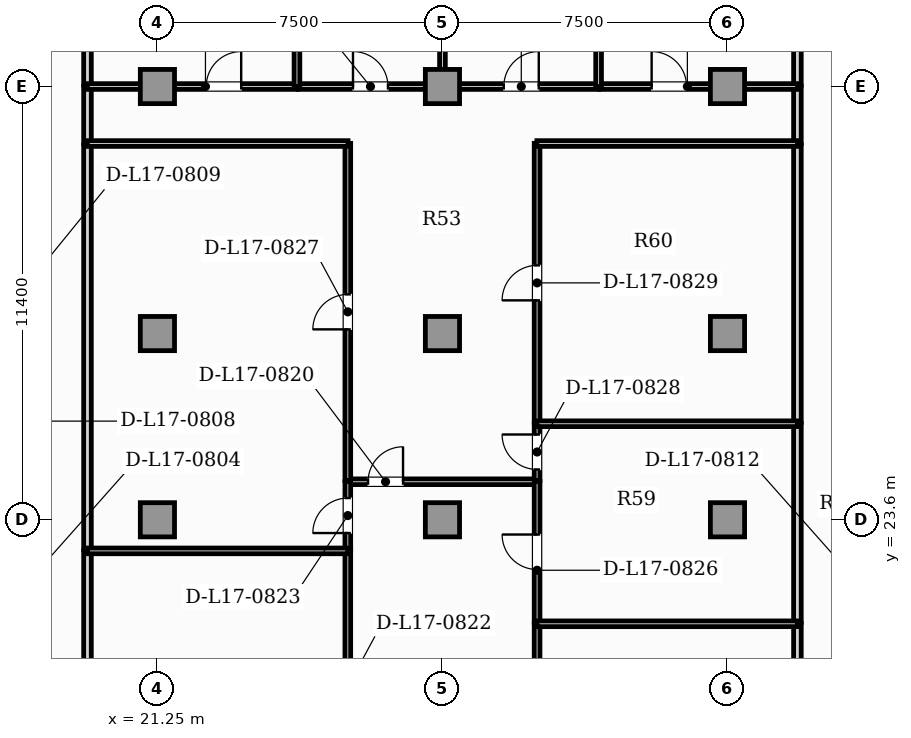
"""IFC4 building model, lengths in metres.
Left out: names, types, materials, properties, quantities, classifications, styles, units other than length and angle.
Written with IfcOpenShell. Run it as: python <this file> out.ifc"""

import sys

from ifc_helpers import new_model, si_unit, direction, frame, frame_2d, origin, origin_2d, place, context, subcontext, project, spatial, rectangle, extrude, element, fill, save


model = new_model("IFC4")
c1 = context("Model", 3, precision=1e-05, world=origin(), true_north=direction((0.0, 1.0)))
c2 = subcontext(c1, "Body", "Model", "MODEL_VIEW")
j1 = project(units=[si_unit("LENGTHUNIT", "METRE"), si_unit("PLANEANGLEUNIT", "RADIAN")], contexts=[c1])
p1 = place(None, origin())
s1 = spatial("IfcSite", under=j1, at=p1, CompositionType="ELEMENT")
p2 = place(p1, origin())
s2 = spatial("IfcBuilding", under=s1, at=p2, CompositionType="ELEMENT")
p3 = place(p2, frame((0.0, 0.0, 72.15)))
s3 = spatial("IfcBuildingStorey", under=s2, at=p3, CompositionType="ELEMENT", Elevation=72.15)
for number, where, z_axis, x_axis in (
    (1, (21.25, 23.6, 0.0), (0.0, 0.0, 1.0), (1.0, 0.0, 0.0)),
    (2, (28.75, 23.6, 0.0), (0.0, 0.0, 1.0), (1.0, 0.0, 0.0)),
    (3, (36.25, 23.6, 0.0), (0.0, 0.0, 1.0), (1.0, 0.0, 0.0)),
    (4, (21.25, 28.5, 0.0), (0.0, 0.0, 1.0), (1.0, 0.0, 0.0)),
    (5, (28.75, 28.5, 0.0), (0.0, 0.0, 1.0), (1.0, 0.0, 0.0)),
    (6, (36.25, 28.5, 0.0), (0.0, 0.0, 1.0), (1.0, 0.0, 0.0)),
    (7, (21.25, 35.0, 0.0), (0.0, 0.0, 1.0), (1.0, 0.0, 0.0)),
    (8, (28.75, 35.0, 0.0), (0.0, 0.0, 1.0), (1.0, 0.0, 0.0)),
    (9, (36.25, 35.0, 0.0), (0.0, 0.0, 1.0), (1.0, 0.0, 0.0)),
):
    element("IfcColumn", number, at=place(p3, frame(where, z_axis=z_axis, x_axis=x_axis)), inside=s3, PredefinedType="COLUMN", context=c2, shape_type="SweptSolid", body=[
        extrude(rectangle(XDim=0.9, YDim=0.9, at=origin_2d()), origin(), (0.0, 0.0, 1.0), 3.85),
    ])
p4 = place(p3, frame((19.41, 33.495, 0.0), z_axis=(0.0, 0.0, 1.0), x_axis=(0.0, 1.0, 0.0)))
e10 = element("IfcWall", 10, at=p4, inside=s3, PredefinedType="PARTITIONING", context=c2, shape_type="SweptSolid", body=[
    extrude(rectangle(XDim=1.51, YDim=0.2, at=frame_2d((0.755, 0.0))), origin(), (0.0, 0.0, 1.0), 3.57),
])
p5 = place(p3, frame((19.41, 18.792, 0.0), z_axis=(0.0, 0.0, 1.0), x_axis=(0.0, 1.0, 0.0)))
e11 = element("IfcWall", 11, at=p5, inside=s3, PredefinedType="PARTITIONING", context=c2, shape_type="SweptSolid", body=[
    extrude(rectangle(XDim=3.995, YDim=0.2, at=frame_2d((1.998, 0.0))), origin(), (0.0, 0.0, 1.0), 3.57),
])
p6 = place(p3, frame((19.41, 22.817, 0.0), z_axis=(0.0, 0.0, 1.0), x_axis=(0.0, 1.0, 0.0)))
e12 = element("IfcWall", 12, at=p6, inside=s3, PredefinedType="PARTITIONING", context=c2, shape_type="SweptSolid", body=[
    extrude(rectangle(XDim=10.648, YDim=0.2, at=frame_2d((5.324, 0.0))), origin(), (0.0, 0.0, 1.0), 3.57),
])
p7 = place(p3, frame((19.41, 35.035, 0.0), z_axis=(0.0, 0.0, 1.0), x_axis=(0.0, 1.0, 0.0)))
e13 = element("IfcWall", 13, at=p7, inside=s3, PredefinedType="PARTITIONING", context=c2, shape_type="SweptSolid", body=[
    extrude(rectangle(XDim=3.55, YDim=0.2, at=frame_2d((1.775, 0.0))), origin(), (0.0, 0.0, 1.0), 3.57),
])
p8 = place(p3, frame((38.09, 33.495, 0.0), z_axis=(0.0, 0.0, 1.0), x_axis=(0.0, 1.0, 0.0)))
e14 = element("IfcWall", 14, at=p8, inside=s3, PredefinedType="PARTITIONING", context=c2, shape_type="SweptSolid", body=[
    extrude(rectangle(XDim=1.51, YDim=0.2, at=frame_2d((0.755, 0.0))), origin(), (0.0, 0.0, 1.0), 3.57),
])
p9 = place(p3, frame((38.09, 17.265, 0.0), z_axis=(0.0, 0.0, 1.0), x_axis=(0.0, 1.0, 0.0)))
e15 = element("IfcWall", 15, at=p9, inside=s3, PredefinedType="PARTITIONING", context=c2, shape_type="SweptSolid", body=[
    extrude(rectangle(XDim=3.604, YDim=0.2, at=frame_2d((1.802, 0.0))), origin(), (0.0, 0.0, 1.0), 3.57),
])
p10 = place(p3, frame((38.09, 20.899, 0.0), z_axis=(0.0, 0.0, 1.0), x_axis=(0.0, 1.0, 0.0)))
e16 = element("IfcWall", 16, at=p10, inside=s3, PredefinedType="PARTITIONING", context=c2, shape_type="SweptSolid", body=[
    extrude(rectangle(XDim=5.234, YDim=0.2, at=frame_2d((2.617, 0.0))), origin(), (0.0, 0.0, 1.0), 3.57),
])
p11 = place(p3, frame((38.09, 26.162, 0.0), z_axis=(0.0, 0.0, 1.0), x_axis=(0.0, 1.0, 0.0)))
e17 = element("IfcWall", 17, at=p11, inside=s3, PredefinedType="PARTITIONING", context=c2, shape_type="SweptSolid", body=[
    extrude(rectangle(XDim=7.303, YDim=0.2, at=frame_2d((3.651, 0.0))), origin(), (0.0, 0.0, 1.0), 3.57),
])
p12 = place(p3, frame((38.09, 35.035, 0.0), z_axis=(0.0, 0.0, 1.0), x_axis=(0.0, 1.0, 0.0)))
e18 = element("IfcWall", 18, at=p12, inside=s3, PredefinedType="PARTITIONING", context=c2, shape_type="SweptSolid", body=[
    extrude(rectangle(XDim=3.55, YDim=0.2, at=frame_2d((1.775, 0.0))), origin(), (0.0, 0.0, 1.0), 3.57),
])
p13 = place(p3, frame((26.255, 24.601, 0.0), z_axis=(0.0, 0.0, 1.0), x_axis=(1.0, 0.0, 0.0)))
e19 = element("IfcWall", 19, at=p13, inside=s3, PredefinedType="PARTITIONING", context=c2, shape_type="SweptSolid", body=[
    extrude(rectangle(XDim=4.99, YDim=0.15, at=frame_2d((2.495, 0.0))), origin(), (0.0, 0.0, 1.0), 3.57),
])
p14 = place(p13, frame((0.538, 0.0, 0.0)))
e20 = element("IfcOpeningElement", 20, at=p14, cuts=e19, PredefinedType="OPENING", context=c2, shape_type="SweptSolid", body=[
    extrude(rectangle(XDim=0.92, YDim=2.1, at=frame_2d((0.46, 1.05))), frame((0.0, 0.085, 0.0), z_axis=(0.0, -1.0, 0.0), x_axis=(1.0, 0.0, 0.0)), (0.0, 0.0, 1.0), 0.17),
])
p15 = place(p3, frame((26.26, 15.635, 0.0), z_axis=(0.0, 0.0, 1.0), x_axis=(0.0, 1.0, 0.0)))
e21 = element("IfcWall", 21, at=p15, inside=s3, PredefinedType="PARTITIONING", context=c2, shape_type="SweptSolid", body=[
    extrude(rectangle(XDim=7.152, YDim=0.15, at=frame_2d((3.576, 0.0))), origin(), (0.0, 0.0, 1.0), 3.57),
])
p16 = place(p15, frame((3.116, 0.0, 0.0)))
e22 = element("IfcOpeningElement", 22, at=p16, cuts=e21, PredefinedType="OPENING", context=c2, shape_type="SweptSolid", body=[
    extrude(rectangle(XDim=0.92, YDim=2.1, at=frame_2d((0.46, 1.05))), frame((0.0, 0.085, 0.0), z_axis=(0.0, -1.0, 0.0), x_axis=(1.0, 0.0, 0.0)), (0.0, 0.0, 1.0), 0.17),
])
p17 = place(p3, frame((26.26, 22.817, 0.0), z_axis=(0.0, 0.0, 1.0), x_axis=(0.0, 1.0, 0.0)))
e23 = element("IfcWall", 23, at=p17, inside=s3, PredefinedType="PARTITIONING", context=c2, shape_type="SweptSolid", body=[
    extrude(rectangle(XDim=1.789, YDim=0.15, at=frame_2d((0.895, 0.0))), origin(), (0.0, 0.0, 1.0), 3.57),
])
p18 = place(p17, frame((0.435, 0.0, 0.0)))
e24 = element("IfcOpeningElement", 24, at=p18, cuts=e23, PredefinedType="OPENING", context=c2, shape_type="SweptSolid", body=[
    extrude(rectangle(XDim=0.92, YDim=2.1, at=frame_2d((0.46, 1.05))), frame((0.0, 0.085, 0.0), z_axis=(0.0, -1.0, 0.0), x_axis=(1.0, 0.0, 0.0)), (0.0, 0.0, 1.0), 0.17),
])
p19 = place(p3, frame((31.24, 15.635, 0.0), z_axis=(0.0, 0.0, 1.0), x_axis=(0.0, 1.0, 0.0)))
e25 = element("IfcWall", 25, at=p19, inside=s3, PredefinedType="PARTITIONING", context=c2, shape_type="SweptSolid", body=[
    extrude(rectangle(XDim=5.234, YDim=0.15, at=frame_2d((2.617, 0.0))), origin(), (0.0, 0.0, 1.0), 3.57),
])
p20 = place(p19, frame((2.157, 0.0, 0.0)))
e26 = element("IfcOpeningElement", 26, at=p20, cuts=e25, PredefinedType="OPENING", context=c2, shape_type="SweptSolid", body=[
    extrude(rectangle(XDim=0.92, YDim=2.1, at=frame_2d((0.46, 1.05))), frame((0.0, 0.085, 0.0), z_axis=(0.0, -1.0, 0.0), x_axis=(1.0, 0.0, 0.0)), (0.0, 0.0, 1.0), 0.17),
])
p21 = place(p3, frame((31.24, 20.899, 0.0), z_axis=(0.0, 0.0, 1.0), x_axis=(0.0, 1.0, 0.0)))
e27 = element("IfcWall", 27, at=p21, inside=s3, PredefinedType="PARTITIONING", context=c2, shape_type="SweptSolid", body=[
    extrude(rectangle(XDim=3.707, YDim=0.15, at=frame_2d((1.854, 0.0))), origin(), (0.0, 0.0, 1.0), 3.57),
])
p22 = place(p21, frame((1.394, 0.0, 0.0)))
e28 = element("IfcOpeningElement", 28, at=p22, cuts=e27, PredefinedType="OPENING", context=c2, shape_type="SweptSolid", body=[
    extrude(rectangle(XDim=0.92, YDim=2.1, at=frame_2d((0.46, 1.05))), frame((0.0, 0.085, 0.0), z_axis=(0.0, -1.0, 0.0), x_axis=(1.0, 0.0, 0.0)), (0.0, 0.0, 1.0), 0.17),
])
p23 = place(p3, frame((26.26, 24.636, 0.0), z_axis=(0.0, 0.0, 1.0), x_axis=(0.0, 1.0, 0.0)))
e29 = element("IfcWall", 29, at=p23, inside=s3, PredefinedType="PARTITIONING", context=c2, shape_type="SweptSolid", body=[
    extrude(rectangle(XDim=8.869, YDim=0.15, at=frame_2d((4.435, 0.0))), origin(), (0.0, 0.0, 1.0), 3.57),
])
p24 = place(p23, frame((3.975, 0.0, 0.0)))
e30 = element("IfcOpeningElement", 30, at=p24, cuts=e29, PredefinedType="OPENING", context=c2, shape_type="SweptSolid", body=[
    extrude(rectangle(XDim=0.92, YDim=2.1, at=frame_2d((0.46, 1.05))), frame((0.0, 0.085, 0.0), z_axis=(0.0, -1.0, 0.0), x_axis=(1.0, 0.0, 0.0)), (0.0, 0.0, 1.0), 0.17),
])
p25 = place(p3, frame((19.405, 33.5, 0.0), z_axis=(0.0, 0.0, 1.0), x_axis=(1.0, 0.0, 0.0)))
e31 = element("IfcWall", 31, at=p25, inside=s3, PredefinedType="PARTITIONING", context=c2, shape_type="SweptSolid", body=[
    extrude(rectangle(XDim=6.86, YDim=0.15, at=frame_2d((3.43, 0.0))), origin(), (0.0, 0.0, 1.0), 3.57),
])
p26 = place(p3, frame((31.24, 24.636, 0.0), z_axis=(0.0, 0.0, 1.0), x_axis=(0.0, 1.0, 0.0)))
e32 = element("IfcWall", 32, at=p26, inside=s3, PredefinedType="PARTITIONING", context=c2, shape_type="SweptSolid", body=[
    extrude(rectangle(XDim=1.497, YDim=0.15, at=frame_2d((0.748, 0.0))), origin(), (0.0, 0.0, 1.0), 3.57),
])
p27 = place(p26, frame((0.288, 0.0, 0.0)))
e33 = element("IfcOpeningElement", 33, at=p27, cuts=e32, PredefinedType="OPENING", context=c2, shape_type="SweptSolid", body=[
    extrude(rectangle(XDim=0.92, YDim=2.1, at=frame_2d((0.46, 1.05))), frame((0.0, 0.085, 0.0), z_axis=(0.0, -1.0, 0.0), x_axis=(1.0, 0.0, 0.0)), (0.0, 0.0, 1.0), 0.17),
])
p28 = place(p3, frame((31.24, 26.162, 0.0), z_axis=(0.0, 0.0, 1.0), x_axis=(0.0, 1.0, 0.0)))
e34 = element("IfcWall", 34, at=p28, inside=s3, PredefinedType="PARTITIONING", context=c2, shape_type="SweptSolid", body=[
    extrude(rectangle(XDim=7.343, YDim=0.15, at=frame_2d((3.671, 0.0))), origin(), (0.0, 0.0, 1.0), 3.57),
])
p29 = place(p28, frame((3.211, 0.0, 0.0)))
e35 = element("IfcOpeningElement", 35, at=p29, cuts=e34, PredefinedType="OPENING", context=c2, shape_type="SweptSolid", body=[
    extrude(rectangle(XDim=0.92, YDim=2.1, at=frame_2d((0.46, 1.05))), frame((0.0, 0.085, 0.0), z_axis=(0.0, -1.0, 0.0), x_axis=(1.0, 0.0, 0.0)), (0.0, 0.0, 1.0), 0.17),
])
p30 = place(p3, frame((31.235, 33.5, 0.0), z_axis=(0.0, 0.0, 1.0), x_axis=(1.0, 0.0, 0.0)))
e36 = element("IfcWall", 36, at=p30, inside=s3, PredefinedType="PARTITIONING", context=c2, shape_type="SweptSolid", body=[
    extrude(rectangle(XDim=6.86, YDim=0.15, at=frame_2d((3.43, 0.0))), origin(), (0.0, 0.0, 1.0), 3.57),
])
p31 = place(p3, frame((19.405, 35.0, 0.0), z_axis=(0.0, 0.0, 1.0), x_axis=(1.0, 0.0, 0.0)))
e37 = element("IfcWall", 37, at=p31, inside=s3, PredefinedType="PARTITIONING", context=c2, shape_type="SweptSolid", body=[
    extrude(rectangle(XDim=5.522, YDim=0.15, at=frame_2d((2.761, 0.0))), origin(), (0.0, 0.0, 1.0), 2.934),
])
p32 = place(p31, frame((3.129, 0.0, 0.0)))
e38 = element("IfcOpeningElement", 38, at=p32, cuts=e37, PredefinedType="OPENING", context=c2, shape_type="SweptSolid", body=[
    extrude(rectangle(XDim=0.92, YDim=2.1, at=frame_2d((0.46, 1.05))), frame((0.0, 0.085, 0.0), z_axis=(0.0, -1.0, 0.0), x_axis=(1.0, 0.0, 0.0)), (0.0, 0.0, 1.0), 0.17),
])
p33 = place(p3, frame((24.957, 35.0, 0.0), z_axis=(0.0, 0.0, 1.0), x_axis=(1.0, 0.0, 0.0)))
e39 = element("IfcWall", 39, at=p33, inside=s3, PredefinedType="PARTITIONING", context=c2, shape_type="SweptSolid", body=[
    extrude(rectangle(XDim=3.798, YDim=0.15, at=frame_2d((1.899, 0.0))), origin(), (0.0, 0.0, 1.0), 2.934),
])
p34 = place(p33, frame((1.439, 0.0, 0.0)))
e40 = element("IfcOpeningElement", 40, at=p34, cuts=e39, PredefinedType="OPENING", context=c2, shape_type="SweptSolid", body=[
    extrude(rectangle(XDim=0.92, YDim=2.1, at=frame_2d((0.46, 1.05))), frame((0.0, 0.085, 0.0), z_axis=(0.0, -1.0, 0.0), x_axis=(1.0, 0.0, 0.0)), (0.0, 0.0, 1.0), 0.17),
])
p35 = place(p3, frame((28.785, 35.0, 0.0), z_axis=(0.0, 0.0, 1.0), x_axis=(1.0, 0.0, 0.0)))
e41 = element("IfcWall", 41, at=p35, inside=s3, PredefinedType="PARTITIONING", context=c2, shape_type="SweptSolid", body=[
    extrude(rectangle(XDim=4.079, YDim=0.15, at=frame_2d((2.04, 0.0))), origin(), (0.0, 0.0, 1.0), 2.934),
])
p36 = place(p35, frame((1.579, 0.0, 0.0)))
e42 = element("IfcOpeningElement", 42, at=p36, cuts=e41, PredefinedType="OPENING", context=c2, shape_type="SweptSolid", body=[
    extrude(rectangle(XDim=0.92, YDim=2.1, at=frame_2d((0.46, 1.05))), frame((0.0, 0.085, 0.0), z_axis=(0.0, -1.0, 0.0), x_axis=(1.0, 0.0, 0.0)), (0.0, 0.0, 1.0), 0.17),
])
p37 = place(p3, frame((32.894, 35.0, 0.0), z_axis=(0.0, 0.0, 1.0), x_axis=(1.0, 0.0, 0.0)))
e43 = element("IfcWall", 43, at=p37, inside=s3, PredefinedType="PARTITIONING", context=c2, shape_type="SweptSolid", body=[
    extrude(rectangle(XDim=5.201, YDim=0.15, at=frame_2d((2.601, 0.0))), origin(), (0.0, 0.0, 1.0), 2.934),
])
p38 = place(p37, frame((1.361, 0.0, 0.0)))
e44 = element("IfcOpeningElement", 44, at=p38, cuts=e43, PredefinedType="OPENING", context=c2, shape_type="SweptSolid", body=[
    extrude(rectangle(XDim=0.92, YDim=2.1, at=frame_2d((0.46, 1.05))), frame((0.0, 0.085, 0.0), z_axis=(0.0, -1.0, 0.0), x_axis=(1.0, 0.0, 0.0)), (0.0, 0.0, 1.0), 0.17),
])
for number, where, z_axis, x_axis in (
    (45, (19.405, 22.782, 0.0), (0.0, 0.0, 1.0), (1.0, 0.0, 0.0)),
    (46, (31.235, 20.864, 0.0), (0.0, 0.0, 1.0), (1.0, 0.0, 0.0)),
    (47, (31.235, 26.127, 0.0), (0.0, 0.0, 1.0), (1.0, 0.0, 0.0)),
):
    element("IfcWall", number, at=place(p3, frame(where, z_axis=z_axis, x_axis=x_axis)), inside=s3, PredefinedType="PARTITIONING", context=c2, shape_type="SweptSolid", body=[
        extrude(rectangle(XDim=6.86, YDim=0.15, at=frame_2d((3.43, 0.0))), origin(), (0.0, 0.0, 1.0), 3.57),
    ])
p39 = place(p3, frame((24.922, 34.995, 0.0), z_axis=(0.0, 0.0, 1.0), x_axis=(0.0, 1.0, 0.0)))
e48 = element("IfcWall", 48, at=p39, inside=s3, PredefinedType="PARTITIONING", context=c2, shape_type="SweptSolid", body=[
    extrude(rectangle(XDim=6.395, YDim=0.15, at=frame_2d((3.197, 0.0))), origin(), (0.0, 0.0, 1.0), 3.57),
])
p40 = place(p3, frame((28.75, 34.995, 0.0), z_axis=(0.0, 0.0, 1.0), x_axis=(0.0, 1.0, 0.0)))
e49 = element("IfcWall", 49, at=p40, inside=s3, PredefinedType="PARTITIONING", context=c2, shape_type="SweptSolid", body=[
    extrude(rectangle(XDim=6.395, YDim=0.15, at=frame_2d((3.197, 0.0))), origin(), (0.0, 0.0, 1.0), 3.11),
])
p41 = place(p3, frame((32.859, 34.995, 0.0), z_axis=(0.0, 0.0, 1.0), x_axis=(0.0, 1.0, 0.0)))
e50 = element("IfcWall", 50, at=p41, inside=s3, PredefinedType="PARTITIONING", context=c2, shape_type="SweptSolid", body=[
    extrude(rectangle(XDim=6.395, YDim=0.15, at=frame_2d((3.197, 0.0))), origin(), (0.0, 0.0, 1.0), 3.57),
])
p42 = place(p14, origin())
e51 = element("IfcDoor", 51, at=p42, inside=s3, OperationType="SINGLE_SWING_RIGHT", PredefinedType="DOOR", context=c2, shape_type="SweptSolid", body=[
    extrude(rectangle(XDim=0.92, YDim=2.1, at=frame_2d((0.46, 1.05))), frame((0.0, 0.025, 0.0), z_axis=(0.0, -1.0, 0.0), x_axis=(1.0, 0.0, 0.0)), (0.0, 0.0, 1.0), 0.05),
])
fill(e20, e51)
p43 = place(p18, origin())
e52 = element("IfcDoor", 52, at=p43, inside=s3, OperationType="SINGLE_SWING_LEFT", PredefinedType="DOOR", context=c2, shape_type="SweptSolid", body=[
    extrude(rectangle(XDim=0.92, YDim=2.1, at=frame_2d((0.46, 1.05))), frame((0.0, 0.025, 0.0), z_axis=(0.0, -1.0, 0.0), x_axis=(1.0, 0.0, 0.0)), (0.0, 0.0, 1.0), 0.05),
])
fill(e24, e52)
p44 = place(p22, origin())
e53 = element("IfcDoor", 53, at=p44, inside=s3, OperationType="SINGLE_SWING_RIGHT", PredefinedType="DOOR", context=c2, shape_type="SweptSolid", body=[
    extrude(rectangle(XDim=0.92, YDim=2.1, at=frame_2d((0.46, 1.05))), frame((0.0, 0.025, 0.0), z_axis=(0.0, -1.0, 0.0), x_axis=(1.0, 0.0, 0.0)), (0.0, 0.0, 1.0), 0.05),
])
fill(e28, e53)
p45 = place(p24, origin())
e54 = element("IfcDoor", 54, at=p45, inside=s3, OperationType="SINGLE_SWING_LEFT", PredefinedType="DOOR", context=c2, shape_type="SweptSolid", body=[
    extrude(rectangle(XDim=0.92, YDim=2.1, at=frame_2d((0.46, 1.05))), frame((0.0, 0.025, 0.0), z_axis=(0.0, -1.0, 0.0), x_axis=(1.0, 0.0, 0.0)), (0.0, 0.0, 1.0), 0.05),
])
fill(e30, e54)
p46 = place(p27, origin())
e55 = element("IfcDoor", 55, at=p46, inside=s3, OperationType="SINGLE_SWING_RIGHT", PredefinedType="DOOR", context=c2, shape_type="SweptSolid", body=[
    extrude(rectangle(XDim=0.92, YDim=2.1, at=frame_2d((0.46, 1.05))), frame((0.0, 0.025, 0.0), z_axis=(0.0, -1.0, 0.0), x_axis=(1.0, 0.0, 0.0)), (0.0, 0.0, 1.0), 0.05),
])
fill(e33, e55)
p47 = place(p29, origin())
e56 = element("IfcDoor", 56, at=p47, inside=s3, OperationType="SINGLE_SWING_LEFT", PredefinedType="DOOR", context=c2, shape_type="SweptSolid", body=[
    extrude(rectangle(XDim=0.92, YDim=2.1, at=frame_2d((0.46, 1.05))), frame((0.0, 0.025, 0.0), z_axis=(0.0, -1.0, 0.0), x_axis=(1.0, 0.0, 0.0)), (0.0, 0.0, 1.0), 0.05),
])
fill(e35, e56)
p48 = place(p32, origin())
e57 = element("IfcDoor", 57, at=p48, inside=s3, OperationType="SINGLE_SWING_RIGHT", PredefinedType="DOOR", context=c2, shape_type="SweptSolid", body=[
    extrude(rectangle(XDim=0.92, YDim=2.1, at=frame_2d((0.46, 1.05))), frame((0.0, 0.025, 0.0), z_axis=(0.0, -1.0, 0.0), x_axis=(1.0, 0.0, 0.0)), (0.0, 0.0, 1.0), 0.05),
])
fill(e38, e57)
p49 = place(p34, origin())
e58 = element("IfcDoor", 58, at=p49, inside=s3, OperationType="SINGLE_SWING_LEFT", PredefinedType="DOOR", context=c2, shape_type="SweptSolid", body=[
    extrude(rectangle(XDim=0.92, YDim=2.1, at=frame_2d((0.46, 1.05))), frame((0.0, 0.025, 0.0), z_axis=(0.0, -1.0, 0.0), x_axis=(1.0, 0.0, 0.0)), (0.0, 0.0, 1.0), 0.05),
])
fill(e40, e58)
p50 = place(p36, origin())
e59 = element("IfcDoor", 59, at=p50, inside=s3, OperationType="SINGLE_SWING_RIGHT", PredefinedType="DOOR", context=c2, shape_type="SweptSolid", body=[
    extrude(rectangle(XDim=0.92, YDim=2.1, at=frame_2d((0.46, 1.05))), frame((0.0, 0.025, 0.0), z_axis=(0.0, -1.0, 0.0), x_axis=(1.0, 0.0, 0.0)), (0.0, 0.0, 1.0), 0.05),
])
fill(e42, e59)
p51 = place(p38, origin())
e60 = element("IfcDoor", 60, at=p51, inside=s3, OperationType="SINGLE_SWING_LEFT", PredefinedType="DOOR", context=c2, shape_type="SweptSolid", body=[
    extrude(rectangle(XDim=0.92, YDim=2.1, at=frame_2d((0.46, 1.05))), frame((0.0, 0.025, 0.0), z_axis=(0.0, -1.0, 0.0), x_axis=(1.0, 0.0, 0.0)), (0.0, 0.0, 1.0), 0.05),
])
fill(e44, e60)
save(model, sys.argv[1])
